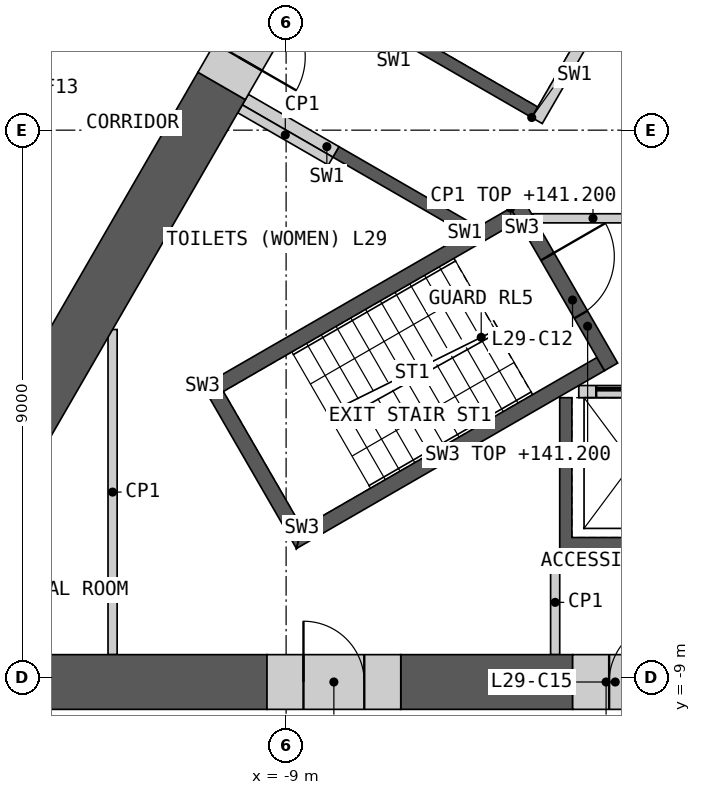
"""IFC4 building model, lengths in metres.
Left out: names, types, materials, properties, quantities, classifications, styles, units other than length and angle.
Written with IfcOpenShell. Run it as: python <this file> out.ifc"""

import sys

from ifc_helpers import new_model, si_unit, direction, frame, frame_2d, origin, place, context, subcontext, project, spatial, polyline, rectangle, outline, extrude, element, fill, save


model = new_model("IFC4")
c1 = context("Model", 3, precision=1e-05, world=origin(), true_north=direction((0.0, 1.0)))
c2 = subcontext(c1, "Body", "Model", "MODEL_VIEW")
j1 = project(units=[si_unit("LENGTHUNIT", "METRE"), si_unit("PLANEANGLEUNIT", "RADIAN")], contexts=[c1])
p1 = place(None, origin())
s1 = spatial("IfcSite", under=j1, at=p1, CompositionType="ELEMENT")
p2 = place(p1, origin())
s2 = spatial("IfcBuilding", under=s1, at=p2, CompositionType="ELEMENT")
p3 = place(p2, frame((0.0, 0.0, 137.4)))
s3 = spatial("IfcBuildingStorey", under=s2, at=p3, CompositionType="ELEMENT", Elevation=137.4)
p4 = place(p3, origin())
e1 = element("IfcWall", 1, at=p4, inside=s3, PredefinedType="SHEAR", context=c2, shape_type="SweptSolid", body=[
    extrude(outline(polyline([(4.5, -4.4), (4.5, -6.906), (-4.5, -6.906), (-4.5, -4.4), (-4.3, -4.4), (-4.3, -6.7), (-2.3, -6.7), (-2.3, -4.4), (-2.1, -4.4), (-2.1, -6.7), (-0.1, -6.7), (-0.1, -4.4), (0.1, -4.4), (0.1, -6.7), (2.1, -6.7), (2.1, -4.4), (2.3, -4.4), (2.3, -6.7), (4.3, -6.7), (4.3, -4.4), (4.5, -4.4)])), origin(), (0.0, 0.0, 1.0), 3.8),
])
p5 = place(p3, frame((-4.187, -4.3, 0.0), z_axis=(0.0, 0.0, 1.0), x_axis=(1.0, 0.0, 0.0)))
e2 = element("IfcWall", 2, at=p5, inside=s3, PredefinedType="SOLIDWALL", context=c2, shape_type="SweptSolid", body=[
    extrude(rectangle(XDim=8.373, YDim=0.2, at=frame_2d((4.187, 0.0))), origin(), (0.0, 0.0, 1.0), 3.8),
])
p6 = place(p5, frame((0.287, 0.0, 0.0)))
e3 = element("IfcOpeningElement", 3, at=p6, cuts=e2, PredefinedType="OPENING", context=c2, shape_type="SweptSolid", body=[
    extrude(rectangle(XDim=1.2, YDim=2.1, at=frame_2d((0.6, 1.05))), frame((0.0, 0.11, 0.0), z_axis=(0.0, -1.0, 0.0), x_axis=(1.0, 0.0, 0.0)), (0.0, 0.0, 1.0), 0.22),
])
p7 = place(p5, frame((2.387, 0.0, 0.0)))
e4 = element("IfcOpeningElement", 4, at=p7, cuts=e2, PredefinedType="OPENING", context=c2, shape_type="SweptSolid", body=[
    extrude(rectangle(XDim=1.4, YDim=2.1, at=frame_2d((0.7, 1.05))), frame((0.0, 0.11, 0.0), z_axis=(0.0, -1.0, 0.0), x_axis=(1.0, 0.0, 0.0)), (0.0, 0.0, 1.0), 0.22),
])
p8 = place(p5, frame((4.737, 0.0, 0.0)))
e5 = element("IfcOpeningElement", 5, at=p8, cuts=e2, PredefinedType="OPENING", context=c2, shape_type="SweptSolid", body=[
    extrude(rectangle(XDim=1.1, YDim=2.1, at=frame_2d((0.55, 1.05))), frame((0.0, 0.11, 0.0), z_axis=(0.0, -1.0, 0.0), x_axis=(1.0, 0.0, 0.0)), (0.0, 0.0, 1.0), 0.22),
])
p9 = place(p5, frame((6.887, 0.0, 0.0)))
e6 = element("IfcOpeningElement", 6, at=p9, cuts=e2, PredefinedType="OPENING", context=c2, shape_type="SweptSolid", body=[
    extrude(rectangle(XDim=1.2, YDim=2.1, at=frame_2d((0.6, 1.05))), frame((0.0, 0.11, 0.0), z_axis=(0.0, -1.0, 0.0), x_axis=(1.0, 0.0, 0.0)), (0.0, 0.0, 1.0), 0.22),
])
p10 = place(p3, origin())
e7 = element("IfcWall", 7, at=p10, inside=s3, PredefinedType="SHEAR", context=c2, shape_type="SweptSolid", body=[
    extrude(outline(polyline([(-6.061, -1.697), (-8.231, -0.444), (-8.131, -0.271), (-5.96, -1.524), (-6.061, -1.697)])), origin(), (0.0, 0.0, 1.0), 3.8),
])
p11 = place(p3, origin())
e8 = element("IfcWall", 8, at=p11, inside=s3, PredefinedType="SHEAR", context=c2, shape_type="SweptSolid", body=[
    extrude(outline(polyline([(-4.96, 0.208), (-7.131, 1.461), (-5.931, 3.54), (-3.76, 2.287), (-3.861, 2.113), (-5.852, 3.263), (-6.852, 1.531), (-4.861, 0.381), (-4.96, 0.208)])), origin(), (0.0, 0.0, 1.0), 3.8),
])
p12 = place(p3, frame((-1.631, 5.776, 0.0), z_axis=(0.0, 0.0, 1.0), x_axis=(-0.499992876559, -0.866029516466, 0.0)))
e9 = element("IfcWall", 9, at=p12, inside=s3, PredefinedType="SOLIDWALL", context=c2, shape_type="SweptSolid", body=[
    extrude(rectangle(XDim=6.486, YDim=0.2, at=frame_2d((3.243, 0.0))), origin(), (0.0, 0.0, 1.0), 3.8),
])
p13 = place(p12, frame((0.437, 0.0, 0.0)))
e10 = element("IfcOpeningElement", 10, at=p13, cuts=e9, PredefinedType="OPENING", context=c2, shape_type="SweptSolid", body=[
    extrude(rectangle(XDim=0.9, YDim=2.1, at=frame_2d((0.45, 1.05))), frame((0.0, 0.11, 0.0), z_axis=(0.0, -1.0, 0.0), x_axis=(1.0, 0.0, 0.0)), (0.0, 0.0, 1.0), 0.22),
])
p14 = place(p12, frame((2.637, 0.0, 0.0)))
e11 = element("IfcOpeningElement", 11, at=p14, cuts=e9, PredefinedType="OPENING", context=c2, shape_type="SweptSolid", body=[
    extrude(rectangle(XDim=0.9, YDim=2.1, at=frame_2d((0.45, 1.05))), frame((0.0, 0.11, 0.0), z_axis=(0.0, -1.0, 0.0), x_axis=(1.0, 0.0, 0.0)), (0.0, 0.0, 1.0), 0.22),
])
p15 = place(p3, frame((-8.181, -0.357, 0.0), z_axis=(0.0, 0.0, 1.0), x_axis=(-0.866024871741, 0.500000921525, 0.0)))
e12 = element("IfcWall", 12, at=p15, inside=s3, PredefinedType="SHEAR", context=c2, shape_type="SweptSolid", body=[
    extrude(rectangle(XDim=1.72, YDim=0.2, at=frame_2d((0.86, 0.0))), origin(), (0.0, 0.0, 1.0), 3.8),
])
p16 = place(p3, frame((-4.941, -1.45, 0.0), z_axis=(0.0, 0.0, 1.0), x_axis=(1.0, 0.0, 0.0)))
e13 = element("IfcWall", 13, at=p16, inside=s3, PredefinedType="PARTITIONING", context=c2, shape_type="SweptSolid", body=[
    extrude(rectangle(XDim=9.882, YDim=0.15, at=frame_2d((4.941, 0.0))), origin(), (0.0, 0.0, 1.0), 3.8),
])
p17 = place(p16, frame((4.391, 0.0, 0.0)))
e14 = element("IfcOpeningElement", 14, at=p17, cuts=e13, PredefinedType="OPENING", context=c2, shape_type="SweptSolid", body=[
    extrude(rectangle(XDim=1.1, YDim=2.1, at=frame_2d((0.55, 1.05))), frame((0.0, 0.085, 0.0), z_axis=(0.0, -1.0, 0.0), x_axis=(1.0, 0.0, 0.0)), (0.0, 0.0, 1.0), 0.17),
])
p18 = place(p3, origin())
e15 = element("IfcWall", 15, at=p18, inside=s3, PredefinedType="SHEAR", context=c2, shape_type="SweptSolid", body=[
    extrude(outline(polyline([(-5.307, -1.281), (-10.374, -4.206), (-10.032, -4.298), (-5.182, -1.498), (-5.307, -1.281)])), origin(), (0.0, 0.0, 1.0), 3.8),
])
p19 = place(p3, origin())
e16 = element("IfcWall", 16, at=p19, inside=s3, PredefinedType="SHEAR", context=c2, shape_type="SweptSolid", body=[
    extrude(outline(polyline([(-10.374, -4.206), (-8.83, -6.881), (-8.738, -6.539), (-10.032, -4.298), (-10.374, -4.206)])), origin(), (0.0, 0.0, 1.0), 3.8),
])
p20 = place(p3, origin())
e17 = element("IfcWall", 17, at=p20, inside=s3, PredefinedType="SHEAR", context=c2, shape_type="SweptSolid", body=[
    extrude(outline(polyline([(-8.738, -6.539), (-8.83, -6.881), (-3.763, -3.956), (-3.888, -3.739), (-8.738, -6.539)])), origin(), (0.0, 0.0, 1.0), 3.8),
])
p21 = place(p3, frame((-5.199, -1.219, 0.0), z_axis=(0.0, 0.0, 1.0), x_axis=(0.499982516597, -0.866035497597, 0.0)))
e18 = element("IfcWall", 18, at=p21, inside=s3, PredefinedType="SHEAR", context=c2, shape_type="SweptSolid", body=[
    extrude(rectangle(XDim=3.088, YDim=0.25, at=frame_2d((1.544, 0.0))), origin(), (0.0, 0.0, 1.0), 3.8),
])
p22 = place(p21, frame((0.994, 0.0, 0.0)))
e19 = element("IfcOpeningElement", 19, at=p22, cuts=e18, PredefinedType="OPENING", context=c2, shape_type="SweptSolid", body=[
    extrude(rectangle(XDim=1.1, YDim=2.1, at=frame_2d((0.55, 1.05))), frame((0.0, 0.135, 0.0), z_axis=(0.0, -1.0, 0.0), x_axis=(1.0, 0.0, 0.0)), (0.0, 0.0, 1.0), 0.27),
])
for number, where, z_axis, x_axis in (
    (20, (-8.268, -0.509, 0.0), (0.0, 0.0, 1.0), (-0.866, 0.5, 0.0)),
    (21, (-4.575, -6.906, 0.0), (0.0, 0.0, 1.0), (0.0, -1.0, 0.0)),
):
    element("IfcWall", number, at=place(p3, frame(where, z_axis=z_axis, x_axis=x_axis)), inside=s3, PredefinedType="PARTITIONING", context=c2, shape_type="SweptSolid", body=[
        extrude(rectangle(XDim=1.72, YDim=0.15, at=frame_2d((0.86, 0.0))), origin(), (0.0, 0.0, 1.0), 3.8),
    ])
p23 = place(p3, frame((-11.854, -8.626, 0.0), z_axis=(0.0, 0.0, 1.0), x_axis=(0.0, 1.0, 0.0)))
e22 = element("IfcWall", 22, at=p23, inside=s3, PredefinedType="PARTITIONING", context=c2, shape_type="SweptSolid", body=[
    extrude(rectangle(XDim=5.347, YDim=0.15, at=frame_2d((2.674, 0.0))), origin(), (0.0, 0.0, 1.0), 3.8),
])
p24 = place(p3, frame((-14.941, -9.076, 0.0), z_axis=(0.0, 0.0, 1.0), x_axis=(1.0, 0.0, 0.0)))
e23 = element("IfcWall", 23, at=p24, inside=s3, PredefinedType="SHEAR", context=c2, shape_type="SweptSolid", body=[
    extrude(rectangle(XDim=5.627, YDim=0.9, at=frame_2d((2.813, 0.0))), origin(), (0.0, 0.0, 1.0), 3.8),
])
p25 = place(p3, frame((-7.115, -9.076, 0.0), z_axis=(0.0, 0.0, 1.0), x_axis=(1.0, 0.0, 0.0)))
e24 = element("IfcWall", 24, at=p25, inside=s3, PredefinedType="SHEAR", context=c2, shape_type="SweptSolid", body=[
    extrude(rectangle(XDim=2.827, YDim=0.9, at=frame_2d((1.414, 0.0))), origin(), (0.0, 0.0, 1.0), 3.8),
])
p26 = place(p3, frame((-10.06, 0.728, 0.0), z_axis=(0.0, 0.0, 1.0), x_axis=(-0.500002975332, -0.866023685969, 0.0)))
e25 = element("IfcWall", 25, at=p26, inside=s3, PredefinedType="SHEAR", context=c2, shape_type="SweptSolid", body=[
    extrude(rectangle(XDim=6.429, YDim=0.9, at=frame_2d((3.214, 0.0))), origin(), (0.0, 0.0, 1.0), 3.8),
])
p27 = place(p3, frame((-4.288, -9.076, 0.0), z_axis=(0.0, 0.0, 1.0), x_axis=(1.0, 0.0, 0.0)))
e26 = element("IfcWall", 26, at=p27, inside=s3, PredefinedType="SHEAR", context=c2, shape_type="SweptSolid", body=[
    extrude(rectangle(XDim=2.2, YDim=0.9, at=frame_2d((1.1, 0.0))), origin(), (0.0, 0.0, 1.0), 3.8),
])
p28 = place(p27, frame((0.6, 0.0, 0.0)))
e27 = element("IfcOpeningElement", 27, at=p28, cuts=e26, PredefinedType="OPENING", context=c2, shape_type="SweptSolid", body=[
    extrude(rectangle(XDim=1.0, YDim=2.1, at=frame_2d((0.5, 1.05))), frame((0.0, 0.46, 0.0), z_axis=(0.0, -1.0, 0.0), x_axis=(1.0, 0.0, 0.0)), (0.0, 0.0, 1.0), 0.92),
])
p29 = place(p3, frame((-9.314, -9.076, 0.0), z_axis=(0.0, 0.0, 1.0), x_axis=(1.0, 0.0, 0.0)))
e28 = element("IfcWall", 28, at=p29, inside=s3, PredefinedType="SHEAR", context=c2, shape_type="SweptSolid", body=[
    extrude(rectangle(XDim=2.2, YDim=0.9, at=frame_2d((1.1, 0.0))), origin(), (0.0, 0.0, 1.0), 3.8),
])
p30 = place(p29, frame((0.6, 0.0, 0.0)))
e29 = element("IfcOpeningElement", 29, at=p30, cuts=e28, PredefinedType="OPENING", context=c2, shape_type="SweptSolid", body=[
    extrude(rectangle(XDim=1.0, YDim=2.1, at=frame_2d((0.5, 1.05))), frame((0.0, 0.46, 0.0), z_axis=(0.0, -1.0, 0.0), x_axis=(1.0, 0.0, 0.0)), (0.0, 0.0, 1.0), 0.92),
])
p31 = place(p3, frame((-8.96, 2.633, 0.0), z_axis=(0.0, 0.0, 1.0), x_axis=(-0.50002983664, -0.866008176907, 0.0)))
e30 = element("IfcWall", 30, at=p31, inside=s3, PredefinedType="SHEAR", context=c2, shape_type="SweptSolid", body=[
    extrude(rectangle(XDim=2.2, YDim=0.9, at=frame_2d((1.1, 0.0))), origin(), (0.0, 0.0, 1.0), 3.8),
])
p32 = place(p31, frame((0.55, 0.0, 0.0)))
e31 = element("IfcOpeningElement", 31, at=p32, cuts=e30, PredefinedType="OPENING", context=c2, shape_type="SweptSolid", body=[
    extrude(rectangle(XDim=1.1, YDim=2.1, at=frame_2d((0.55, 1.05))), frame((0.0, 0.46, 0.0), z_axis=(0.0, -1.0, 0.0), x_axis=(1.0, 0.0, 0.0)), (0.0, 0.0, 1.0), 0.92),
])
p33 = place(p3, frame((-15.361, -2.754, 0.0), z_axis=(0.0, 0.0, 1.0), x_axis=(0.500004141693, 0.866023012564, 0.0)))
e32 = element("IfcWall", 32, at=p33, inside=s3, PredefinedType="PARTITIONING", context=c2, shape_type="SweptSolid", body=[
    extrude(rectangle(XDim=9.803, YDim=0.2, at=frame_2d((4.902, 0.0))), origin(), (0.0, 0.0, 1.0), 3.8),
])
p34 = place(p33, frame((4.452, 0.0, 0.0)))
e33 = element("IfcOpeningElement", 33, at=p34, cuts=e32, PredefinedType="OPENING", context=c2, shape_type="SweptSolid", body=[
    extrude(rectangle(XDim=1.0, YDim=2.1, at=frame_2d((0.5, 1.05))), frame((0.0, 0.11, 0.0), z_axis=(0.0, -1.0, 0.0), x_axis=(1.0, 0.0, 0.0)), (0.0, 0.0, 1.0), 0.22),
])
p35 = place(p6, origin())
e34 = element("IfcDoor", 34, at=p35, inside=s3, OperationType="SLIDING_TO_LEFT", PredefinedType="DOOR", context=c2, shape_type="SweptSolid", body=[
    extrude(rectangle(XDim=1.2, YDim=2.1, at=frame_2d((0.6, 1.05))), frame((0.0, 0.025, 0.0), z_axis=(0.0, -1.0, 0.0), x_axis=(1.0, 0.0, 0.0)), (0.0, 0.0, 1.0), 0.05),
])
fill(e3, e34)
p36 = place(p22, origin())
e35 = element("IfcDoor", 35, at=p36, inside=s3, OperationType="SINGLE_SWING_LEFT", PredefinedType="DOOR", context=c2, shape_type="SweptSolid", body=[
    extrude(rectangle(XDim=1.1, YDim=2.1, at=frame_2d((0.55, 1.05))), frame((0.0, 0.025, 0.0), z_axis=(0.0, -1.0, 0.0), x_axis=(1.0, 0.0, 0.0)), (0.0, 0.0, 1.0), 0.05),
])
fill(e19, e35)
p37 = place(p28, origin())
e36 = element("IfcDoor", 36, at=p37, inside=s3, OperationType="SINGLE_SWING_RIGHT", PredefinedType="DOOR", context=c2, shape_type="SweptSolid", body=[
    extrude(rectangle(XDim=1.0, YDim=2.1, at=frame_2d((0.5, 1.05))), frame((0.0, 0.205, 0.0), z_axis=(0.0, -1.0, 0.0), x_axis=(1.0, 0.0, 0.0)), (0.0, 0.0, 1.0), 0.05),
])
fill(e27, e36)
p38 = place(p30, origin())
e37 = element("IfcDoor", 37, at=p38, inside=s3, OperationType="SINGLE_SWING_LEFT", PredefinedType="DOOR", context=c2, shape_type="SweptSolid", body=[
    extrude(rectangle(XDim=1.0, YDim=2.1, at=frame_2d((0.5, 1.05))), frame((0.0, 0.205, 0.0), z_axis=(0.0, -1.0, 0.0), x_axis=(1.0, 0.0, 0.0)), (0.0, 0.0, 1.0), 0.05),
])
fill(e29, e37)
p39 = place(p32, origin())
e38 = element("IfcDoor", 38, at=p39, inside=s3, OperationType="SINGLE_SWING_RIGHT", PredefinedType="DOOR", context=c2, shape_type="SweptSolid", body=[
    extrude(rectangle(XDim=1.1, YDim=2.1, at=frame_2d((0.55, 1.05))), frame((0.0, 0.205, 0.0), z_axis=(0.0, -1.0, 0.0), x_axis=(1.0, 0.0, 0.0)), (0.0, 0.0, 1.0), 0.05),
])
fill(e31, e38)
p40 = place(p34, origin())
e39 = element("IfcDoor", 39, at=p40, inside=s3, OperationType="SINGLE_SWING_RIGHT", PredefinedType="DOOR", context=c2, shape_type="SweptSolid", body=[
    extrude(rectangle(XDim=1.0, YDim=2.1, at=frame_2d((0.5, 1.05))), frame((0.0, 0.025, 0.0), z_axis=(0.0, -1.0, 0.0), x_axis=(1.0, 0.0, 0.0)), (0.0, 0.0, 1.0), 0.05),
])
fill(e33, e39)
save(model, sys.argv[1])
